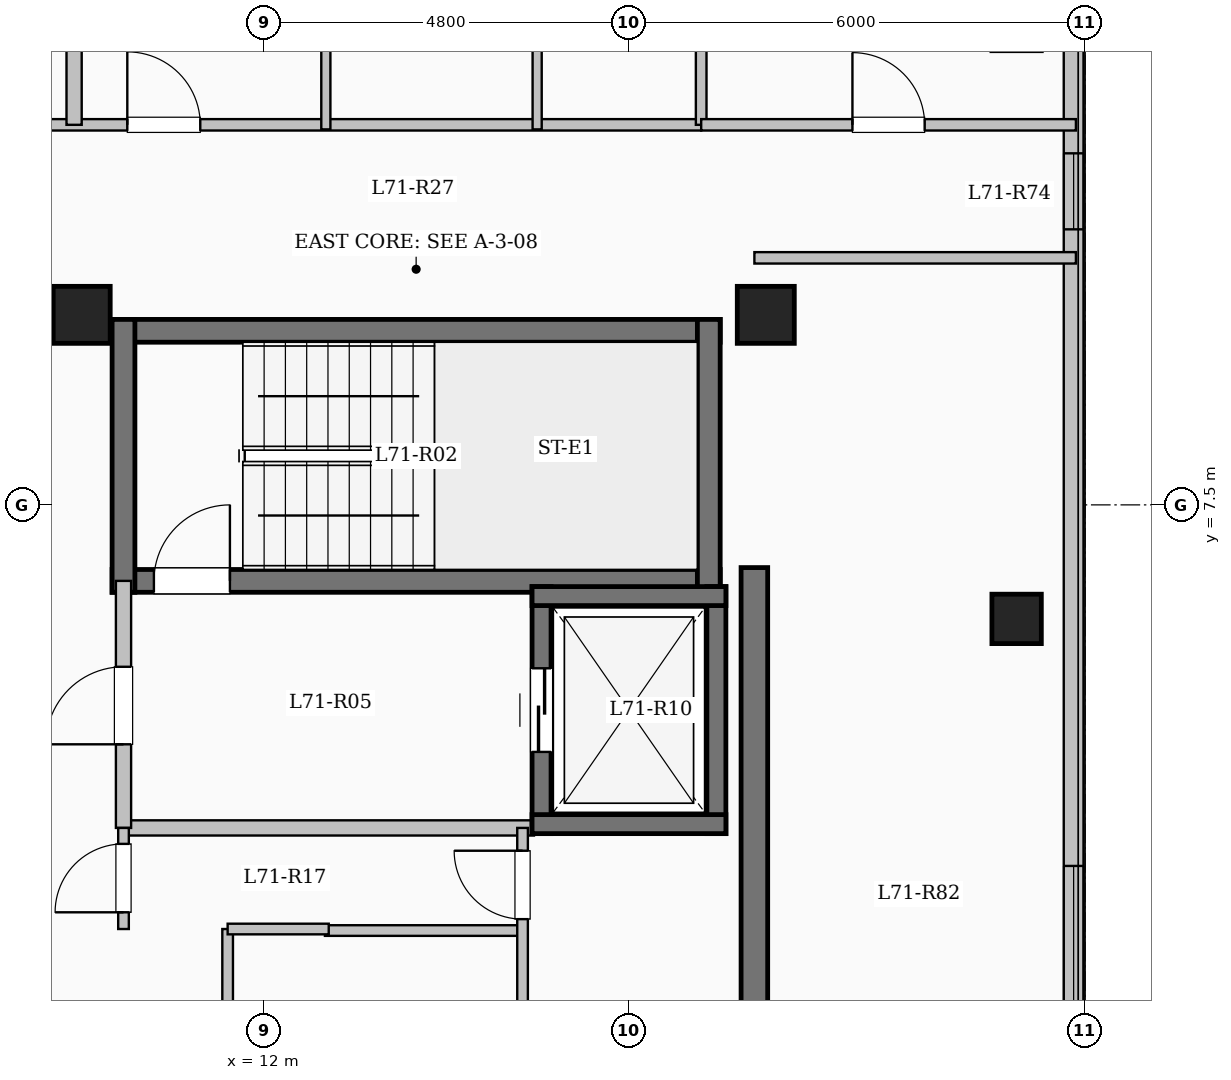
"""IFC4 building model, lengths in metres.
Left out: names, types, materials, properties, quantities, classifications, styles, units other than length and angle.
Written with IfcOpenShell. Run it as: python <this file> out.ifc"""

import sys

from ifc_helpers import new_model, si_unit, direction, frame, frame_2d, origin, origin_2d, place, context, subcontext, project, spatial, rectangle, extrude, element, fill, save


model = new_model("IFC4")
c1 = context("Model", 3, precision=1e-05, world=origin(), true_north=direction((0.0, 1.0)))
c2 = subcontext(c1, "Body", "Model", "MODEL_VIEW")
j1 = project(units=[si_unit("LENGTHUNIT", "METRE"), si_unit("PLANEANGLEUNIT", "RADIAN")], contexts=[c1])
p1 = place(None, origin())
s1 = spatial("IfcSite", under=j1, at=p1, CompositionType="ELEMENT")
p2 = place(p1, origin())
s2 = spatial("IfcBuilding", under=s1, at=p2, CompositionType="ELEMENT")
p3 = place(p2, frame((0.0, 0.0, 261.6)))
s3 = spatial("IfcBuildingStorey", under=s2, at=p3, CompositionType="ELEMENT", Elevation=261.6)
for number, where, z_axis, x_axis in (
    (1, (9.6, 10.0, 0.0), (0.0, 0.0, 1.0), (1.0, 0.0, 0.0)),
    (2, (18.6, 10.0, 0.0), (0.0, 0.0, 1.0), (1.0, 0.0, 0.0)),
):
    element("IfcColumn", number, at=place(p3, frame(where, z_axis=z_axis, x_axis=x_axis)), inside=s3, PredefinedType="COLUMN", context=c2, shape_type="SweptSolid", body=[
        extrude(rectangle(XDim=0.75, YDim=0.75, at=origin_2d()), origin(), (0.0, 0.0, 1.0), 3.35),
    ])
p4 = place(p3, frame((21.9, 6.0, 0.0), z_axis=(0.0, 0.0, 1.0), x_axis=(1.0, 0.0, 0.0)))
e3 = element("IfcColumn", 3, at=p4, inside=s3, PredefinedType="COLUMN", context=c2, shape_type="SweptSolid", body=[
    extrude(rectangle(XDim=0.65, YDim=0.65, at=origin_2d()), origin(), (0.0, 0.0, 1.0), 3.35),
])
p5 = place(p3, frame((22.65, 17.55, 0.0), z_axis=(0.0, 0.0, 1.0), x_axis=(0.0, -1.0, 0.0)))
e4 = element("IfcWall", 4, at=p5, inside=s3, PredefinedType="SOLIDWALL", context=c2, shape_type="SweptSolid", body=[
    extrude(rectangle(XDim=35.1, YDim=0.26, at=frame_2d((17.55, 0.0))), origin(), (0.0, 0.0, 1.0), 3.1),
])
p6 = place(p5, frame((1.525, 0.0, 0.9)))
e5 = element("IfcOpeningElement", 5, at=p6, cuts=e4, PredefinedType="OPENING", context=c2, shape_type="SweptSolid", body=[
    extrude(rectangle(XDim=2.0, YDim=1.7, at=frame_2d((1.0, 0.85))), frame((0.0, 0.14, 0.0), z_axis=(0.0, -1.0, 0.0), x_axis=(1.0, 0.0, 0.0)), (0.0, 0.0, 1.0), 0.28),
])
p7 = place(p5, frame((5.425, 0.0, 0.95)))
e6 = element("IfcOpeningElement", 6, at=p7, cuts=e4, PredefinedType="OPENING", context=c2, shape_type="SweptSolid", body=[
    extrude(rectangle(XDim=1.0, YDim=1.5, at=frame_2d((0.5, 0.75))), frame((0.0, 0.14, 0.0), z_axis=(0.0, -1.0, 0.0), x_axis=(1.0, 0.0, 0.0)), (0.0, 0.0, 1.0), 0.28),
])
p8 = place(p5, frame((14.8, 0.0, 0.9)))
e7 = element("IfcOpeningElement", 7, at=p8, cuts=e4, PredefinedType="OPENING", context=c2, shape_type="SweptSolid", body=[
    extrude(rectangle(XDim=2.0, YDim=1.7, at=frame_2d((1.0, 0.85))), frame((0.0, 0.14, 0.0), z_axis=(0.0, -1.0, 0.0), x_axis=(1.0, 0.0, 0.0)), (0.0, 0.0, 1.0), 0.28),
])
p9 = place(p5, frame((25.275, 0.0, 0.95)))
e8 = element("IfcOpeningElement", 8, at=p9, cuts=e4, PredefinedType="OPENING", context=c2, shape_type="SweptSolid", body=[
    extrude(rectangle(XDim=1.2, YDim=1.5, at=frame_2d((0.6, 0.75))), frame((0.0, 0.14, 0.0), z_axis=(0.0, -1.0, 0.0), x_axis=(1.0, 0.0, 0.0)), (0.0, 0.0, 1.0), 0.28),
])
p10 = place(p5, frame((29.925, 0.0, 0.9)))
e9 = element("IfcOpeningElement", 9, at=p10, cuts=e4, PredefinedType="OPENING", context=c2, shape_type="SweptSolid", body=[
    extrude(rectangle(XDim=2.2, YDim=1.75, at=frame_2d((1.1, 0.875))), frame((0.0, 0.14, 0.0), z_axis=(0.0, -1.0, 0.0), x_axis=(1.0, 0.0, 0.0)), (0.0, 0.0, 1.0), 0.28),
])
p11 = place(p3, frame((10.0, 9.79, 0.0), z_axis=(0.0, 0.0, 1.0), x_axis=(1.0, 0.0, 0.0)))
e10 = element("IfcWall", 10, at=p11, inside=s3, PredefinedType="SHEAR", context=c2, shape_type="SweptSolid", body=[
    extrude(rectangle(XDim=8.0, YDim=0.3, at=frame_2d((4.0, 0.0))), origin(), (0.0, 0.0, 1.0), 3.35),
])
p12 = place(p3, frame((10.0, 6.5, 0.0), z_axis=(0.0, 0.0, 1.0), x_axis=(1.0, 0.0, 0.0)))
e11 = element("IfcWall", 11, at=p12, inside=s3, PredefinedType="SHEAR", context=c2, shape_type="SweptSolid", body=[
    extrude(rectangle(XDim=8.0, YDim=0.3, at=frame_2d((4.0, 0.0))), origin(), (0.0, 0.0, 1.0), 3.35),
])
p13 = place(p12, frame((0.55, 0.0, 0.0)))
e12 = element("IfcOpeningElement", 12, at=p13, cuts=e11, PredefinedType="OPENING", context=c2, shape_type="SweptSolid", body=[
    extrude(rectangle(XDim=1.0, YDim=2.15, at=frame_2d((0.5, 1.075))), frame((0.0, 0.16, 0.0), z_axis=(0.0, -1.0, 0.0), x_axis=(1.0, 0.0, 0.0)), (0.0, 0.0, 1.0), 0.32),
])
for number, where, z_axis, x_axis in (
    (13, (10.15, 6.35, 0.0), (0.0, 0.0, 1.0), (0.0, 1.0, 0.0)),
    (14, (17.85, 6.35, 0.0), (0.0, 0.0, 1.0), (0.0, 1.0, 0.0)),
):
    element("IfcWall", number, at=place(p3, frame(where, z_axis=z_axis, x_axis=x_axis)), inside=s3, PredefinedType="SHEAR", context=c2, shape_type="SweptSolid", body=[
        extrude(rectangle(XDim=3.59, YDim=0.3, at=frame_2d((1.795, 0.0))), origin(), (0.0, 0.0, 1.0), 3.35),
    ])
p14 = place(p3, frame((10.15, 3.25, 0.0), z_axis=(0.0, 0.0, 1.0), x_axis=(1.0, 0.0, 0.0)))
e15 = element("IfcWall", 15, at=p14, inside=s3, PredefinedType="SOLIDWALL", context=c2, shape_type="SweptSolid", body=[
    extrude(rectangle(XDim=5.4, YDim=0.2, at=frame_2d((2.7, 0.0))), origin(), (0.0, 0.0, 1.0), 3.1),
])
p15 = place(p3, frame((10.15, 3.25, 0.0), z_axis=(0.0, 0.0, 1.0), x_axis=(0.0, 1.0, 0.0)))
e16 = element("IfcWall", 16, at=p15, inside=s3, PredefinedType="SOLIDWALL", context=c2, shape_type="SweptSolid", body=[
    extrude(rectangle(XDim=3.25, YDim=0.2, at=frame_2d((1.625, 0.0))), origin(), (0.0, 0.0, 1.0), 3.1),
])
p16 = place(p15, frame((1.1, 0.0, 0.0)))
e17 = element("IfcOpeningElement", 17, at=p16, cuts=e16, PredefinedType="OPENING", context=c2, shape_type="SweptSolid", body=[
    extrude(rectangle(XDim=1.02, YDim=2.15, at=frame_2d((0.51, 1.075))), frame((0.0, 0.11, 0.0), z_axis=(0.0, -1.0, 0.0), x_axis=(1.0, 0.0, 0.0)), (0.0, 0.0, 1.0), 0.22),
])
p17 = place(p3, frame((15.65, 3.175, 0.0), z_axis=(0.0, 0.0, 1.0), x_axis=(0.0, 1.0, 0.0)))
e18 = element("IfcWall", 18, at=p17, inside=s3, PredefinedType="SHEAR", context=c2, shape_type="SweptSolid", body=[
    extrude(rectangle(XDim=3.25, YDim=0.25, at=frame_2d((1.625, 0.0))), origin(), (0.0, 0.0, 1.0), 3.35),
])
p18 = place(p17, frame((1.075, 0.0, 0.0)))
e19 = element("IfcOpeningElement", 19, at=p18, cuts=e18, PredefinedType="OPENING", context=c2, shape_type="SweptSolid", body=[
    extrude(rectangle(XDim=1.1, YDim=2.15, at=frame_2d((0.55, 1.075))), frame((0.0, 0.135, 0.0), z_axis=(0.0, -1.0, 0.0), x_axis=(1.0, 0.0, 0.0)), (0.0, 0.0, 1.0), 0.27),
])
p19 = place(p3, frame((17.95, 3.175, 0.0), z_axis=(0.0, 0.0, 1.0), x_axis=(0.0, 1.0, 0.0)))
e20 = element("IfcWall", 20, at=p19, inside=s3, PredefinedType="SHEAR", context=c2, shape_type="SweptSolid", body=[
    extrude(rectangle(XDim=3.25, YDim=0.25, at=frame_2d((1.625, 0.0))), origin(), (0.0, 0.0, 1.0), 3.35),
])
for number, where, z_axis, x_axis in (
    (21, (15.525, 3.3, 0.0), (0.0, 0.0, 1.0), (1.0, 0.0, 0.0)),
    (22, (15.525, 6.3, 0.0), (0.0, 0.0, 1.0), (1.0, 0.0, 0.0)),
):
    element("IfcWall", number, at=place(p3, frame(where, z_axis=z_axis, x_axis=x_axis)), inside=s3, PredefinedType="SHEAR", context=c2, shape_type="SweptSolid", body=[
        extrude(rectangle(XDim=2.55, YDim=0.25, at=frame_2d((1.275, 0.0))), origin(), (0.0, 0.0, 1.0), 3.35),
    ])
p20 = place(p3, frame((18.45, -7.375, 0.0), z_axis=(0.0, 0.0, 1.0), x_axis=(0.0, 1.0, 0.0)))
e23 = element("IfcWall", 23, at=p20, inside=s3, PredefinedType="SHEAR", context=c2, shape_type="SweptSolid", body=[
    extrude(rectangle(XDim=14.05, YDim=0.35, at=frame_2d((7.025, 0.0))), origin(), (0.0, 0.0, 1.0), 3.35),
])
p21 = place(p3, frame((12.8, 1.9, 0.0), z_axis=(0.0, 0.0, 1.0), x_axis=(1.0, 0.0, 0.0)))
e24 = element("IfcWall", 24, at=p21, inside=s3, PredefinedType="PARTITIONING", context=c2, shape_type="SweptSolid", body=[
    extrude(rectangle(XDim=2.6, YDim=0.14, at=frame_2d((1.3, 0.0))), origin(), (0.0, 0.0, 1.0), 3.1),
])
p22 = place(p3, frame((10.15, 1.92, 0.0), z_axis=(0.0, 0.0, 1.0), x_axis=(0.0, 1.0, 0.0)))
e25 = element("IfcWall", 25, at=p22, inside=s3, PredefinedType="PARTITIONING", context=c2, shape_type="SweptSolid", body=[
    extrude(rectangle(XDim=1.33, YDim=0.14, at=frame_2d((0.665, 0.0))), origin(), (0.0, 0.0, 1.0), 3.1),
])
p23 = place(p22, frame((0.22, 0.0, 0.0)))
e26 = element("IfcOpeningElement", 26, at=p23, cuts=e25, PredefinedType="OPENING", context=c2, shape_type="SweptSolid", body=[
    extrude(rectangle(XDim=0.9, YDim=2.08, at=frame_2d((0.45, 1.04))), frame((0.0, 0.08, 0.0), z_axis=(0.0, -1.0, 0.0), x_axis=(1.0, 0.0, 0.0)), (0.0, 0.0, 1.0), 0.16),
])
p24 = place(p3, frame((15.4, -7.2, 0.0), z_axis=(0.0, 0.0, 1.0), x_axis=(0.0, 1.0, 0.0)))
e27 = element("IfcWall", 27, at=p24, inside=s3, PredefinedType="PARTITIONING", context=c2, shape_type="SweptSolid", body=[
    extrude(rectangle(XDim=10.45, YDim=0.14, at=frame_2d((5.225, 0.0))), origin(), (0.0, 0.0, 1.0), 3.1),
])
p25 = place(p24, frame((9.25, 0.0, 0.0)))
e28 = element("IfcOpeningElement", 28, at=p25, cuts=e27, PredefinedType="OPENING", context=c2, shape_type="SweptSolid", body=[
    extrude(rectangle(XDim=0.9, YDim=2.08, at=frame_2d((0.45, 1.04))), frame((0.0, 0.08, 0.0), z_axis=(0.0, -1.0, 0.0), x_axis=(1.0, 0.0, 0.0)), (0.0, 0.0, 1.0), 0.16),
])
p26 = place(p3, frame((11.52, -7.2, 0.0), z_axis=(0.0, 0.0, 1.0), x_axis=(0.0, 1.0, 0.0)))
e29 = element("IfcWall", 29, at=p26, inside=s3, PredefinedType="PARTITIONING", context=c2, shape_type="SweptSolid", body=[
    extrude(rectangle(XDim=9.12, YDim=0.14, at=frame_2d((4.56, 0.0))), origin(), (0.0, 0.0, 1.0), 3.1),
])
p27 = place(p26, frame((1.8, 0.0, 0.0)))
e30 = element("IfcOpeningElement", 30, at=p27, cuts=e29, PredefinedType="OPENING", context=c2, shape_type="SweptSolid", body=[
    extrude(rectangle(XDim=0.9, YDim=2.08, at=frame_2d((0.45, 1.04))), frame((0.0, 0.08, 0.0), z_axis=(0.0, -1.0, 0.0), x_axis=(1.0, 0.0, 0.0)), (0.0, 0.0, 1.0), 0.16),
])
p28 = place(p26, frame((6.2, 0.0, 0.0)))
e31 = element("IfcOpeningElement", 31, at=p28, cuts=e29, PredefinedType="OPENING", context=c2, shape_type="SweptSolid", body=[
    extrude(rectangle(XDim=0.9, YDim=2.08, at=frame_2d((0.45, 1.04))), frame((0.0, 0.08, 0.0), z_axis=(0.0, -1.0, 0.0), x_axis=(1.0, 0.0, 0.0)), (0.0, 0.0, 1.0), 0.16),
])
p29 = place(p3, frame((11.52, 1.92, 0.0), z_axis=(0.0, 0.0, 1.0), x_axis=(1.0, 0.0, 0.0)))
e32 = element("IfcWall", 32, at=p29, inside=s3, PredefinedType="PARTITIONING", context=c2, shape_type="SweptSolid", body=[
    extrude(rectangle(XDim=1.33, YDim=0.14, at=frame_2d((0.665, 0.0))), origin(), (0.0, 0.0, 1.0), 3.1),
])
p30 = place(p3, frame((3.85, 12.5, 0.0), z_axis=(0.0, 0.0, 1.0), x_axis=(1.0, 0.0, 0.0)))
e33 = element("IfcWall", 33, at=p30, inside=s3, PredefinedType="PARTITIONING", context=c2, shape_type="SweptSolid", body=[
    extrude(rectangle(XDim=13.9, YDim=0.15, at=frame_2d((6.95, 0.0))), origin(), (0.0, 0.0, 1.0), 3.1),
])
p31 = place(p30, frame((0.7, 0.0, 0.0)))
e34 = element("IfcOpeningElement", 34, at=p31, cuts=e33, PredefinedType="OPENING", context=c2, shape_type="SweptSolid", body=[
    extrude(rectangle(XDim=0.96, YDim=2.15, at=frame_2d((0.48, 1.075))), frame((0.0, 0.085, 0.0), z_axis=(0.0, -1.0, 0.0), x_axis=(1.0, 0.0, 0.0)), (0.0, 0.0, 1.0), 0.17),
])
p32 = place(p30, frame((6.35, 0.0, 0.0)))
e35 = element("IfcOpeningElement", 35, at=p32, cuts=e33, PredefinedType="OPENING", context=c2, shape_type="SweptSolid", body=[
    extrude(rectangle(XDim=0.96, YDim=2.15, at=frame_2d((0.48, 1.075))), frame((0.0, 0.085, 0.0), z_axis=(0.0, -1.0, 0.0), x_axis=(1.0, 0.0, 0.0)), (0.0, 0.0, 1.0), 0.17),
])
p33 = place(p3, frame((9.5, 12.5, 0.0), z_axis=(0.0, 0.0, 1.0), x_axis=(0.0, 1.0, 0.0)))
e36 = element("IfcWall", 36, at=p33, inside=s3, PredefinedType="SOLIDWALL", context=c2, shape_type="SweptSolid", body=[
    extrude(rectangle(XDim=8.77, YDim=0.2, at=frame_2d((4.385, 0.0))), origin(), (0.0, 0.0, 1.0), 3.1),
])
p34 = place(p3, frame((12.812, 12.44, 0.0), z_axis=(0.0, 0.0, 1.0), x_axis=(0.0, 1.0, 0.0)))
e37 = element("IfcWall", 37, at=p34, inside=s3, PredefinedType="PARTITIONING", context=c2, shape_type="SweptSolid", body=[
    extrude(rectangle(XDim=8.46, YDim=0.12, at=frame_2d((4.23, 0.0))), origin(), (0.0, 0.0, 1.0), 3.1),
])
p35 = place(p34, frame((2.905, 0.0, 0.0)))
e38 = element("IfcOpeningElement", 38, at=p35, cuts=e37, PredefinedType="OPENING", context=c2, shape_type="SweptSolid", body=[
    extrude(rectangle(XDim=1.08, YDim=2.15, at=frame_2d((0.54, 1.075))), frame((0.0, 0.07, 0.0), z_axis=(0.0, -1.0, 0.0), x_axis=(1.0, 0.0, 0.0)), (0.0, 0.0, 1.0), 0.14),
])
p36 = place(p3, frame((15.592, 12.44, 0.0), z_axis=(0.0, 0.0, 1.0), x_axis=(0.0, 1.0, 0.0)))
e39 = element("IfcWall", 39, at=p36, inside=s3, PredefinedType="PARTITIONING", context=c2, shape_type="SweptSolid", body=[
    extrude(rectangle(XDim=2.62, YDim=0.12, at=frame_2d((1.31, 0.0))), origin(), (0.0, 0.0, 1.0), 3.1),
])
p37 = place(p3, frame((18.45, 10.75, 0.0), z_axis=(0.0, 0.0, 1.0), x_axis=(1.0, 0.0, 0.0)))
e40 = element("IfcWall", 40, at=p37, inside=s3, PredefinedType="PARTITIONING", context=c2, shape_type="SweptSolid", body=[
    extrude(rectangle(XDim=4.23, YDim=0.15, at=frame_2d((2.115, 0.0))), origin(), (0.0, 0.0, 1.0), 3.1),
])
p38 = place(p3, frame((17.75, 12.5, 0.0), z_axis=(0.0, 0.0, 1.0), x_axis=(0.0, 1.0, 0.0)))
e41 = element("IfcWall", 41, at=p38, inside=s3, PredefinedType="PARTITIONING", context=c2, shape_type="SweptSolid", body=[
    extrude(rectangle(XDim=5.05, YDim=0.14, at=frame_2d((2.525, 0.0))), origin(), (0.0, 0.0, 1.0), 3.1),
])
p39 = place(p3, frame((17.75, 12.5, 0.0), z_axis=(0.0, 0.0, 1.0), x_axis=(1.0, 0.0, 0.0)))
e42 = element("IfcWall", 42, at=p39, inside=s3, PredefinedType="PARTITIONING", context=c2, shape_type="SweptSolid", body=[
    extrude(rectangle(XDim=4.93, YDim=0.15, at=frame_2d((2.465, 0.0))), origin(), (0.0, 0.0, 1.0), 3.1),
])
p40 = place(p39, frame((1.99, 0.0, 0.0)))
e43 = element("IfcOpeningElement", 43, at=p40, cuts=e42, PredefinedType="OPENING", context=c2, shape_type="SweptSolid", body=[
    extrude(rectangle(XDim=0.95, YDim=2.15, at=frame_2d((0.475, 1.075))), frame((0.0, 0.085, 0.0), z_axis=(0.0, -1.0, 0.0), x_axis=(1.0, 0.0, 0.0)), (0.0, 0.0, 1.0), 0.17),
])
p41 = place(p7, origin())
e44 = element("IfcWindow", 44, at=p41, inside=s3, PartitioningType="SINGLE_PANEL", PredefinedType="WINDOW", context=c2, shape_type="SweptSolid", body=[
    extrude(rectangle(XDim=1.0, YDim=1.5, at=frame_2d((0.5, 0.75))), frame((0.0, 0.03, 0.0), z_axis=(0.0, -1.0, 0.0), x_axis=(1.0, 0.0, 0.0)), (0.0, 0.0, 1.0), 0.06),
])
fill(e6, e44)
p42 = place(p8, origin())
e45 = element("IfcWindow", 45, at=p42, inside=s3, PartitioningType="SINGLE_PANEL", PredefinedType="WINDOW", context=c2, shape_type="SweptSolid", body=[
    extrude(rectangle(XDim=2.0, YDim=1.7, at=frame_2d((1.0, 0.85))), frame((0.0, 0.03, 0.0), z_axis=(0.0, -1.0, 0.0), x_axis=(1.0, 0.0, 0.0)), (0.0, 0.0, 1.0), 0.06),
])
fill(e7, e45)
p43 = place(p13, origin())
e46 = element("IfcDoor", 46, at=p43, inside=s3, OperationType="SINGLE_SWING_RIGHT", PredefinedType="DOOR", context=c2, shape_type="SweptSolid", body=[
    extrude(rectangle(XDim=1.0, YDim=2.15, at=frame_2d((0.5, 1.075))), frame((0.0, 0.025, 0.0), z_axis=(0.0, -1.0, 0.0), x_axis=(1.0, 0.0, 0.0)), (0.0, 0.0, 1.0), 0.05),
])
fill(e12, e46)
p44 = place(p16, origin())
e47 = element("IfcDoor", 47, at=p44, inside=s3, OperationType="SINGLE_SWING_LEFT", PredefinedType="DOOR", context=c2, shape_type="SweptSolid", body=[
    extrude(rectangle(XDim=1.02, YDim=2.15, at=frame_2d((0.51, 1.075))), frame((0.0, 0.025, 0.0), z_axis=(0.0, -1.0, 0.0), x_axis=(1.0, 0.0, 0.0)), (0.0, 0.0, 1.0), 0.05),
])
fill(e17, e47)
p45 = place(p18, origin())
e48 = element("IfcDoor", 48, at=p45, inside=s3, OperationType="SLIDING_TO_LEFT", PredefinedType="DOOR", context=c2, shape_type="SweptSolid", body=[
    extrude(rectangle(XDim=1.1, YDim=2.15, at=frame_2d((0.55, 1.075))), frame((0.0, 0.025, 0.0), z_axis=(0.0, -1.0, 0.0), x_axis=(1.0, 0.0, 0.0)), (0.0, 0.0, 1.0), 0.05),
])
fill(e19, e48)
p46 = place(p23, origin())
e49 = element("IfcDoor", 49, at=p46, inside=s3, OperationType="SINGLE_SWING_LEFT", PredefinedType="DOOR", context=c2, shape_type="SweptSolid", body=[
    extrude(rectangle(XDim=0.9, YDim=2.08, at=frame_2d((0.45, 1.04))), frame((0.0, 0.025, 0.0), z_axis=(0.0, -1.0, 0.0), x_axis=(1.0, 0.0, 0.0)), (0.0, 0.0, 1.0), 0.05),
])
fill(e26, e49)
p47 = place(p25, origin())
e50 = element("IfcDoor", 50, at=p47, inside=s3, OperationType="SINGLE_SWING_RIGHT", PredefinedType="DOOR", context=c2, shape_type="SweptSolid", body=[
    extrude(rectangle(XDim=0.9, YDim=2.08, at=frame_2d((0.45, 1.04))), frame((0.0, 0.025, 0.0), z_axis=(0.0, -1.0, 0.0), x_axis=(1.0, 0.0, 0.0)), (0.0, 0.0, 1.0), 0.05),
])
fill(e28, e50)
p48 = place(p32, origin())
e51 = element("IfcDoor", 51, at=p48, inside=s3, OperationType="SINGLE_SWING_LEFT", PredefinedType="DOOR", context=c2, shape_type="SweptSolid", body=[
    extrude(rectangle(XDim=0.96, YDim=2.15, at=frame_2d((0.48, 1.075))), frame((0.0, 0.025, 0.0), z_axis=(0.0, -1.0, 0.0), x_axis=(1.0, 0.0, 0.0)), (0.0, 0.0, 1.0), 0.05),
])
fill(e35, e51)
p49 = place(p40, origin())
e52 = element("IfcDoor", 52, at=p49, inside=s3, OperationType="SINGLE_SWING_LEFT", PredefinedType="DOOR", context=c2, shape_type="SweptSolid", body=[
    extrude(rectangle(XDim=0.95, YDim=2.15, at=frame_2d((0.475, 1.075))), frame((0.0, 0.025, 0.0), z_axis=(0.0, -1.0, 0.0), x_axis=(1.0, 0.0, 0.0)), (0.0, 0.0, 1.0), 0.05),
])
fill(e43, e52)
save(model, sys.argv[1])
